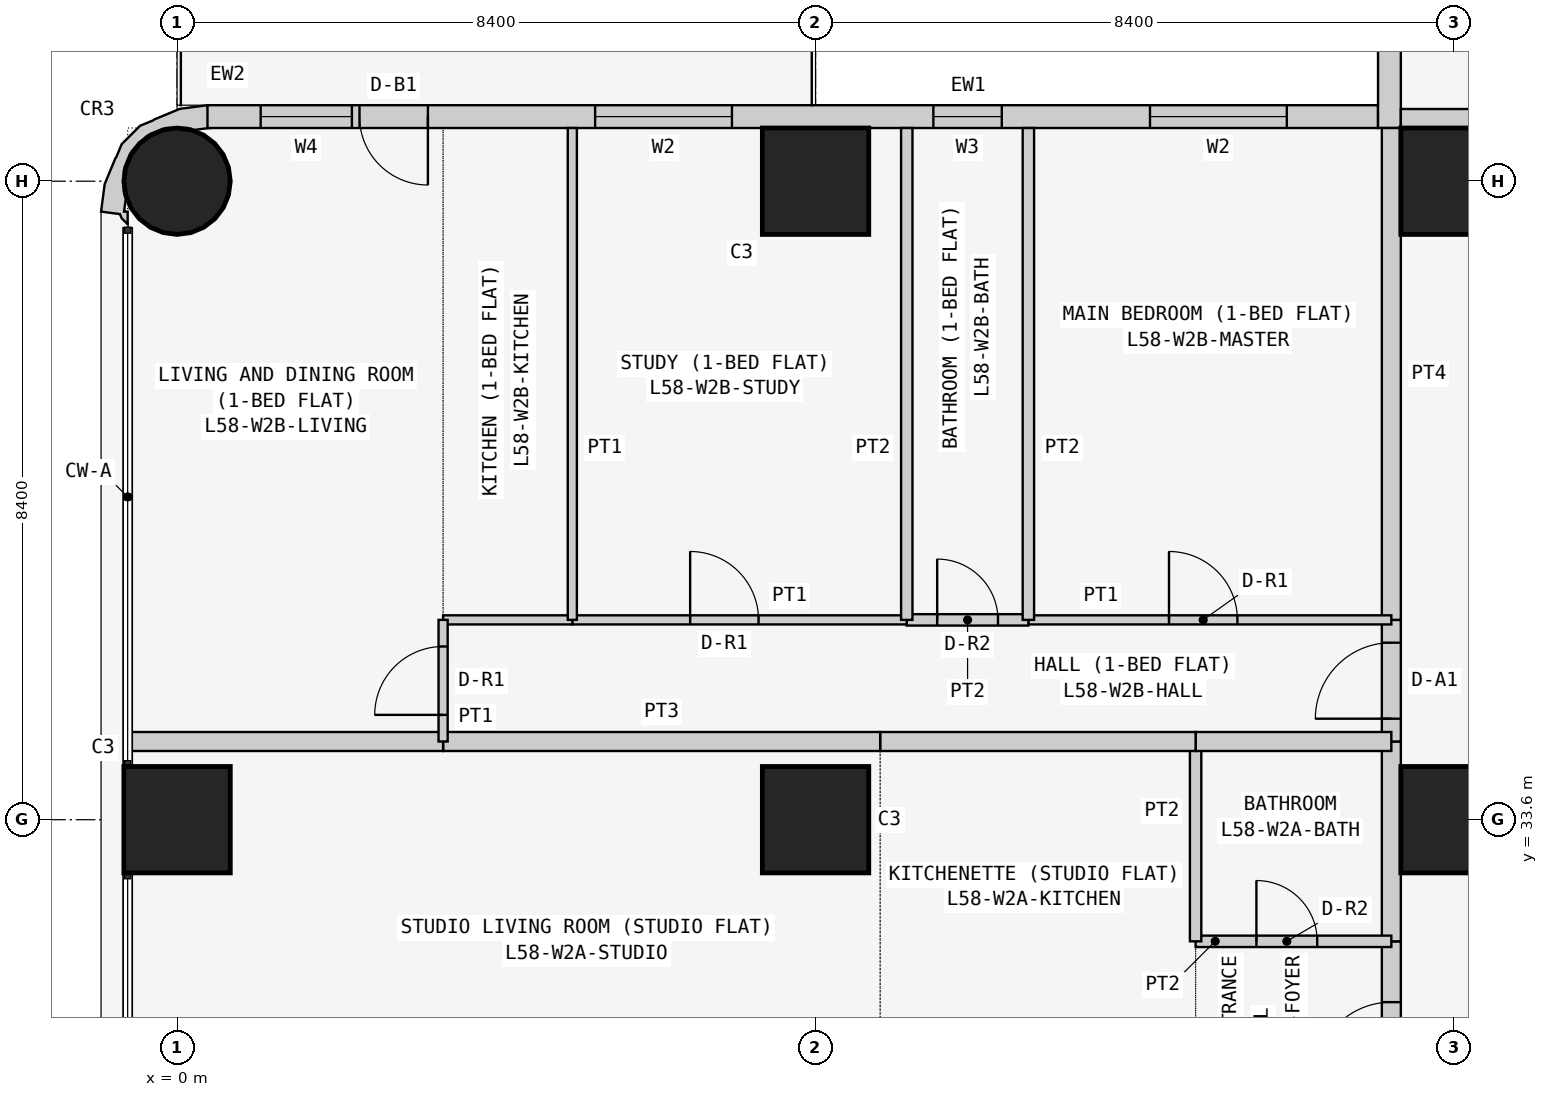
"""IFC4 building model, lengths in metres.
Left out: names, types, materials, properties, quantities, classifications, styles, units other than length and angle.
Written with IfcOpenShell. Run it as: python <this file> out.ifc"""

import sys

from ifc_helpers import new_model, si_unit, direction, frame, frame_2d, origin, origin_2d, place, context, subcontext, project, spatial, polyline, rectangle, circle, outline, extrude, element, fill, save


model = new_model("IFC4")
c1 = context("Model", 3, precision=1e-05, world=origin(), true_north=direction((0.0, 1.0)))
c2 = subcontext(c1, "Body", "Model", "MODEL_VIEW")
j1 = project(units=[si_unit("LENGTHUNIT", "METRE"), si_unit("PLANEANGLEUNIT", "RADIAN")], contexts=[c1])
p1 = place(None, origin())
s1 = spatial("IfcSite", under=j1, at=p1, CompositionType="ELEMENT")
p2 = place(p1, origin())
s2 = spatial("IfcBuilding", under=s1, at=p2, CompositionType="ELEMENT")
p3 = place(p2, frame((0.0, 0.0, 222.9)))
s3 = spatial("IfcBuildingStorey", under=s2, at=p3, CompositionType="ELEMENT", Elevation=222.9)
p4 = place(p3, frame((0.0, 33.6, 0.0), z_axis=(0.0, 0.0, 1.0), x_axis=(1.0, 0.0, 0.0)))
e1 = element("IfcColumn", 1, at=p4, inside=s3, PredefinedType="COLUMN", context=c2, shape_type="SweptSolid", body=[
    extrude(rectangle(XDim=1.4, YDim=1.4, at=origin_2d()), origin(), (0.0, 0.0, 1.0), 3.6),
])
p5 = place(p3, frame((0.0, 42.0, 0.0), z_axis=(0.0, 0.0, 1.0), x_axis=(1.0, 0.0, 0.0)))
e2 = element("IfcColumn", 2, at=p5, inside=s3, PredefinedType="COLUMN", context=c2, shape_type="SweptSolid", body=[
    extrude(circle(Radius=0.7, at=origin_2d()), origin(), (0.0, 0.0, 1.0), 3.6),
])
for number, where, z_axis, x_axis in (
    (3, (8.4, 33.6, 0.0), (0.0, 0.0, 1.0), (1.0, 0.0, 0.0)),
    (4, (8.4, 42.0, 0.0), (0.0, 0.0, 1.0), (1.0, 0.0, 0.0)),
    (5, (16.8, 33.6, 0.0), (0.0, 0.0, 1.0), (1.0, 0.0, 0.0)),
    (6, (16.8, 42.0, 0.0), (0.0, 0.0, 1.0), (1.0, 0.0, 0.0)),
):
    element("IfcColumn", number, at=place(p3, frame(where, z_axis=z_axis, x_axis=x_axis)), inside=s3, PredefinedType="COLUMN", context=c2, shape_type="SweptSolid", body=[
        extrude(rectangle(XDim=1.4, YDim=1.4, at=origin_2d()), origin(), (0.0, 0.0, 1.0), 3.6),
    ])
p6 = place(p3, frame((15.8, 42.85, 0.0), z_axis=(0.0, 0.0, 1.0), x_axis=(-1.0, 0.0, 0.0)))
e7 = element("IfcWall", 7, at=p6, inside=s3, PredefinedType="SOLIDWALL", context=c2, shape_type="SweptSolid", body=[
    extrude(rectangle(XDim=15.4, YDim=0.3, at=frame_2d((7.7, 0.0))), origin(), (0.0, 0.0, 1.0), 3.45),
])
p7 = place(p6, frame((1.2, 0.0, 0.9)))
e8 = element("IfcOpeningElement", 8, at=p7, cuts=e7, PredefinedType="OPENING", context=c2, shape_type="SweptSolid", body=[
    extrude(rectangle(XDim=1.8, YDim=1.5, at=frame_2d((0.9, 0.75))), frame((0.0, 0.16, 0.0), z_axis=(0.0, -1.0, 0.0), x_axis=(1.0, 0.0, 0.0)), (0.0, 0.0, 1.0), 0.32),
])
p8 = place(p6, frame((4.95, 0.0, 1.5)))
e9 = element("IfcOpeningElement", 9, at=p8, cuts=e7, PredefinedType="OPENING", context=c2, shape_type="SweptSolid", body=[
    extrude(rectangle(XDim=0.9, YDim=0.7, at=frame_2d((0.45, 0.35))), frame((0.0, 0.16, 0.0), z_axis=(0.0, -1.0, 0.0), x_axis=(1.0, 0.0, 0.0)), (0.0, 0.0, 1.0), 0.32),
])
p9 = place(p6, frame((8.5, 0.0, 0.9)))
e10 = element("IfcOpeningElement", 10, at=p9, cuts=e7, PredefinedType="OPENING", context=c2, shape_type="SweptSolid", body=[
    extrude(rectangle(XDim=1.8, YDim=1.5, at=frame_2d((0.9, 0.75))), frame((0.0, 0.16, 0.0), z_axis=(0.0, -1.0, 0.0), x_axis=(1.0, 0.0, 0.0)), (0.0, 0.0, 1.0), 0.32),
])
p10 = place(p6, frame((12.5, 0.0, 0.0)))
e11 = element("IfcOpeningElement", 11, at=p10, cuts=e7, PredefinedType="OPENING", context=c2, shape_type="SweptSolid", body=[
    extrude(rectangle(XDim=0.9, YDim=2.4, at=frame_2d((0.45, 1.2))), frame((0.0, 0.16, 0.0), z_axis=(0.0, -1.0, 0.0), x_axis=(1.0, 0.0, 0.0)), (0.0, 0.0, 1.0), 0.32),
])
p11 = place(p6, frame((13.5, 0.0, 0.9)))
e12 = element("IfcOpeningElement", 12, at=p11, cuts=e7, PredefinedType="OPENING", context=c2, shape_type="SweptSolid", body=[
    extrude(rectangle(XDim=1.2, YDim=1.5, at=frame_2d((0.6, 0.75))), frame((0.0, 0.16, 0.0), z_axis=(0.0, -1.0, 0.0), x_axis=(1.0, 0.0, 0.0)), (0.0, 0.0, 1.0), 0.32),
])
p12 = place(p3, frame((15.95, 50.0, 0.0), z_axis=(0.0, 0.0, 1.0), x_axis=(0.0, -1.0, 0.0)))
e13 = element("IfcWall", 13, at=p12, inside=s3, PredefinedType="SOLIDWALL", context=c2, shape_type="SweptSolid", body=[
    extrude(rectangle(XDim=7.3, YDim=0.3, at=frame_2d((3.65, 0.0))), origin(), (0.0, 0.0, 1.0), 3.45),
])
p13 = place(p12, frame((3.1, 0.0, 0.9)))
e14 = element("IfcOpeningElement", 14, at=p13, cuts=e13, PredefinedType="OPENING", context=c2, shape_type="SweptSolid", body=[
    extrude(rectangle(XDim=2.4, YDim=1.5, at=frame_2d((1.2, 0.75))), frame((0.0, 0.16, 0.0), z_axis=(0.0, -1.0, 0.0), x_axis=(1.0, 0.0, 0.0)), (0.0, 0.0, 1.0), 0.32),
])
p14 = place(p12, frame((0.75, 0.0, 0.9)))
e15 = element("IfcOpeningElement", 15, at=p14, cuts=e13, PredefinedType="OPENING", context=c2, shape_type="SweptSolid", body=[
    extrude(rectangle(XDim=1.2, YDim=1.5, at=frame_2d((0.6, 0.75))), frame((0.0, 0.16, 0.0), z_axis=(0.0, -1.0, 0.0), x_axis=(1.0, 0.0, 0.0)), (0.0, 0.0, 1.0), 0.32),
])
p15 = place(p3, frame((0.29, 42.724, 0.0), z_axis=(0.0, 0.0, 1.0), x_axis=(-0.898030234854, 0.439933741929, 0.0)))
e16 = element("IfcWall", 16, at=p15, inside=s3, PredefinedType="SOLIDWALL", context=c2, shape_type="SweptSolid", body=[
    extrude(outline(polyline([(-0.145, -0.044), (0.022, -0.296), (0.327, -0.094), (0.568, 0.18), (0.578, 0.199), (0.7, 0.338), (0.811, 0.661), (0.799, 0.846), (0.803, 0.866), (0.78, 1.231), (0.664, 1.577), (0.426, 1.497), (0.382, 1.536), (0.276, 1.572), (0.349, 1.423), (0.392, 1.444), (0.453, 1.261), (0.51, 1.211), (0.632, 0.961), (0.65, 0.683), (0.56, 0.419), (0.375, 0.21), (0.125, 0.087), (0.05, 0.082), (-0.127, -0.035), (-0.145, -0.044)])), origin(), (0.0, 0.0, 1.0), 3.45),
])
p16 = place(p3, frame((16.1, 42.825, 0.0), z_axis=(0.0, 0.0, 1.0), x_axis=(1.0, 0.0, 0.0)))
e17 = element("IfcWall", 17, at=p16, inside=s3, PredefinedType="PARTITIONING", context=c2, shape_type="SweptSolid", body=[
    extrude(rectangle(XDim=6.471, YDim=0.25, at=frame_2d((3.235, 0.0))), origin(), (0.0, 0.0, 1.0), 3.45),
])
p17 = place(p3, frame((15.975, 29.4, 0.0), z_axis=(0.0, 0.0, 1.0), x_axis=(0.0, 1.0, 0.0)))
e18 = element("IfcWall", 18, at=p17, inside=s3, PredefinedType="PARTITIONING", context=c2, shape_type="SweptSolid", body=[
    extrude(rectangle(XDim=2.6, YDim=0.25, at=frame_2d((1.3, 0.0))), origin(), (0.0, 0.0, 1.0), 3.45),
])
p18 = place(p17, frame((0.8, 0.0, 0.0)))
e19 = element("IfcOpeningElement", 19, at=p18, cuts=e18, PredefinedType="OPENING", context=c2, shape_type="SweptSolid", body=[
    extrude(rectangle(XDim=1.0, YDim=2.1, at=frame_2d((0.5, 1.05))), frame((0.0, 0.135, 0.0), z_axis=(0.0, -1.0, 0.0), x_axis=(1.0, 0.0, 0.0)), (0.0, 0.0, 1.0), 0.27),
])
p19 = place(p3, frame((15.975, 32.0, 0.0), z_axis=(0.0, 0.0, 1.0), x_axis=(0.0, 1.0, 0.0)))
e20 = element("IfcWall", 20, at=p19, inside=s3, PredefinedType="PARTITIONING", context=c2, shape_type="SweptSolid", body=[
    extrude(rectangle(XDim=2.629, YDim=0.25, at=frame_2d((1.314, 0.0))), origin(), (0.0, 0.0, 1.0), 3.45),
])
p20 = place(p3, frame((15.975, 34.629, 0.0), z_axis=(0.0, 0.0, 1.0), x_axis=(0.0, 1.0, 0.0)))
e21 = element("IfcWall", 21, at=p20, inside=s3, PredefinedType="PARTITIONING", context=c2, shape_type="SweptSolid", body=[
    extrude(rectangle(XDim=1.6, YDim=0.25, at=frame_2d((0.8, 0.0))), origin(), (0.0, 0.0, 1.0), 3.45),
])
p21 = place(p20, frame((0.3, 0.0, 0.0)))
e22 = element("IfcOpeningElement", 22, at=p21, cuts=e21, PredefinedType="OPENING", context=c2, shape_type="SweptSolid", body=[
    extrude(rectangle(XDim=1.0, YDim=2.1, at=frame_2d((0.5, 1.05))), frame((0.0, 0.135, 0.0), z_axis=(0.0, -1.0, 0.0), x_axis=(1.0, 0.0, 0.0)), (0.0, 0.0, 1.0), 0.27),
])
p22 = place(p3, frame((15.975, 36.229, 0.0), z_axis=(0.0, 0.0, 1.0), x_axis=(0.0, 1.0, 0.0)))
e23 = element("IfcWall", 23, at=p22, inside=s3, PredefinedType="PARTITIONING", context=c2, shape_type="SweptSolid", body=[
    extrude(rectangle(XDim=6.471, YDim=0.25, at=frame_2d((3.235, 0.0))), origin(), (0.0, 0.0, 1.0), 3.45),
])
p23 = place(p3, frame((13.4, 32.0, 0.0), z_axis=(0.0, 0.0, 1.0), x_axis=(1.0, 0.0, 0.0)))
e24 = element("IfcWall", 24, at=p23, inside=s3, PredefinedType="PARTITIONING", context=c2, shape_type="SweptSolid", body=[
    extrude(rectangle(XDim=2.575, YDim=0.15, at=frame_2d((1.288, 0.0))), origin(), (0.0, 0.0, 1.0), 3.45),
])
p24 = place(p23, frame((0.8, 0.0, 0.0)))
e25 = element("IfcOpeningElement", 25, at=p24, cuts=e24, PredefinedType="OPENING", context=c2, shape_type="SweptSolid", body=[
    extrude(rectangle(XDim=0.8, YDim=2.1, at=frame_2d((0.4, 1.05))), frame((0.0, 0.085, 0.0), z_axis=(0.0, -1.0, 0.0), x_axis=(1.0, 0.0, 0.0)), (0.0, 0.0, 1.0), 0.17),
])
p25 = place(p3, frame((13.4, 32.0, 0.0), z_axis=(0.0, 0.0, 1.0), x_axis=(0.0, 1.0, 0.0)))
e26 = element("IfcWall", 26, at=p25, inside=s3, PredefinedType="PARTITIONING", context=c2, shape_type="SweptSolid", body=[
    extrude(rectangle(XDim=2.629, YDim=0.15, at=frame_2d((1.314, 0.0))), origin(), (0.0, 0.0, 1.0), 3.45),
])
p26 = place(p3, frame((13.4, 34.629, 0.0), z_axis=(0.0, 0.0, 1.0), x_axis=(1.0, 0.0, 0.0)))
e27 = element("IfcWall", 27, at=p26, inside=s3, PredefinedType="PARTITIONING", context=c2, shape_type="SweptSolid", body=[
    extrude(rectangle(XDim=2.575, YDim=0.25, at=frame_2d((1.288, 0.0))), origin(), (0.0, 0.0, 1.0), 3.45),
])
p27 = place(p3, frame((9.25, 34.629, 0.0), z_axis=(0.0, 0.0, 1.0), x_axis=(1.0, 0.0, 0.0)))
e28 = element("IfcWall", 28, at=p27, inside=s3, PredefinedType="PARTITIONING", context=c2, shape_type="SweptSolid", body=[
    extrude(rectangle(XDim=4.15, YDim=0.25, at=frame_2d((2.075, 0.0))), origin(), (0.0, 0.0, 1.0), 3.45),
])
p28 = place(p3, frame((3.5, 34.629, 0.0), z_axis=(0.0, 0.0, 1.0), x_axis=(1.0, 0.0, 0.0)))
e29 = element("IfcWall", 29, at=p28, inside=s3, PredefinedType="PARTITIONING", context=c2, shape_type="SweptSolid", body=[
    extrude(rectangle(XDim=5.75, YDim=0.25, at=frame_2d((2.875, 0.0))), origin(), (0.0, 0.0, 1.0), 3.45),
])
p29 = place(p3, frame((-0.65, 34.629, 0.0), z_axis=(0.0, 0.0, 1.0), x_axis=(1.0, 0.0, 0.0)))
e30 = element("IfcWall", 30, at=p29, inside=s3, PredefinedType="PARTITIONING", context=c2, shape_type="SweptSolid", body=[
    extrude(rectangle(XDim=4.15, YDim=0.25, at=frame_2d((2.075, 0.0))), origin(), (0.0, 0.0, 1.0), 3.45),
])
p30 = place(p3, frame((11.2, 36.229, 0.0), z_axis=(0.0, 0.0, 1.0), x_axis=(1.0, 0.0, 0.0)))
e31 = element("IfcWall", 31, at=p30, inside=s3, PredefinedType="PARTITIONING", context=c2, shape_type="SweptSolid", body=[
    extrude(rectangle(XDim=4.775, YDim=0.12, at=frame_2d((2.388, 0.0))), origin(), (0.0, 0.0, 1.0), 3.45),
])
p31 = place(p30, frame((1.85, 0.0, 0.0)))
e32 = element("IfcOpeningElement", 32, at=p31, cuts=e31, PredefinedType="OPENING", context=c2, shape_type="SweptSolid", body=[
    extrude(rectangle(XDim=0.9, YDim=2.1, at=frame_2d((0.45, 1.05))), frame((0.0, 0.07, 0.0), z_axis=(0.0, -1.0, 0.0), x_axis=(1.0, 0.0, 0.0)), (0.0, 0.0, 1.0), 0.14),
])
p32 = place(p3, frame((9.6, 36.229, 0.0), z_axis=(0.0, 0.0, 1.0), x_axis=(1.0, 0.0, 0.0)))
e33 = element("IfcWall", 33, at=p32, inside=s3, PredefinedType="PARTITIONING", context=c2, shape_type="SweptSolid", body=[
    extrude(rectangle(XDim=1.6, YDim=0.15, at=frame_2d((0.8, 0.0))), origin(), (0.0, 0.0, 1.0), 3.45),
])
p33 = place(p32, frame((0.4, 0.0, 0.0)))
e34 = element("IfcOpeningElement", 34, at=p33, cuts=e33, PredefinedType="OPENING", context=c2, shape_type="SweptSolid", body=[
    extrude(rectangle(XDim=0.8, YDim=2.1, at=frame_2d((0.4, 1.05))), frame((0.0, 0.085, 0.0), z_axis=(0.0, -1.0, 0.0), x_axis=(1.0, 0.0, 0.0)), (0.0, 0.0, 1.0), 0.17),
])
p34 = place(p3, frame((5.2, 36.229, 0.0), z_axis=(0.0, 0.0, 1.0), x_axis=(1.0, 0.0, 0.0)))
e35 = element("IfcWall", 35, at=p34, inside=s3, PredefinedType="PARTITIONING", context=c2, shape_type="SweptSolid", body=[
    extrude(rectangle(XDim=4.4, YDim=0.12, at=frame_2d((2.2, 0.0))), origin(), (0.0, 0.0, 1.0), 3.45),
])
p35 = place(p34, frame((1.55, 0.0, 0.0)))
e36 = element("IfcOpeningElement", 36, at=p35, cuts=e35, PredefinedType="OPENING", context=c2, shape_type="SweptSolid", body=[
    extrude(rectangle(XDim=0.9, YDim=2.1, at=frame_2d((0.45, 1.05))), frame((0.0, 0.07, 0.0), z_axis=(0.0, -1.0, 0.0), x_axis=(1.0, 0.0, 0.0)), (0.0, 0.0, 1.0), 0.14),
])
p36 = place(p3, frame((3.5, 36.229, 0.0), z_axis=(0.0, 0.0, 1.0), x_axis=(1.0, 0.0, 0.0)))
e37 = element("IfcWall", 37, at=p36, inside=s3, PredefinedType="PARTITIONING", context=c2, shape_type="SweptSolid", body=[
    extrude(rectangle(XDim=1.7, YDim=0.12, at=frame_2d((0.85, 0.0))), origin(), (0.0, 0.0, 1.0), 3.45),
])
p37 = place(p3, frame((3.5, 34.629, 0.0), z_axis=(0.0, 0.0, 1.0), x_axis=(0.0, 1.0, 0.0)))
e38 = element("IfcWall", 38, at=p37, inside=s3, PredefinedType="PARTITIONING", context=c2, shape_type="SweptSolid", body=[
    extrude(rectangle(XDim=1.6, YDim=0.12, at=frame_2d((0.8, 0.0))), origin(), (0.0, 0.0, 1.0), 3.45),
])
p38 = place(p37, frame((0.35, 0.0, 0.0)))
e39 = element("IfcOpeningElement", 39, at=p38, cuts=e38, PredefinedType="OPENING", context=c2, shape_type="SweptSolid", body=[
    extrude(rectangle(XDim=0.9, YDim=2.1, at=frame_2d((0.45, 1.05))), frame((0.0, 0.07, 0.0), z_axis=(0.0, -1.0, 0.0), x_axis=(1.0, 0.0, 0.0)), (0.0, 0.0, 1.0), 0.14),
])
for number, where, z_axis, x_axis in (
    (40, (11.2, 36.229, 0.0), (0.0, 0.0, 1.0), (0.0, 1.0, 0.0)),
    (41, (9.6, 36.229, 0.0), (0.0, 0.0, 1.0), (0.0, 1.0, 0.0)),
):
    element("IfcWall", number, at=place(p3, frame(where, z_axis=z_axis, x_axis=x_axis)), inside=s3, PredefinedType="PARTITIONING", context=c2, shape_type="SweptSolid", body=[
        extrude(rectangle(XDim=6.471, YDim=0.15, at=frame_2d((3.235, 0.0))), origin(), (0.0, 0.0, 1.0), 3.45),
    ])
p39 = place(p3, frame((5.2, 36.229, 0.0), z_axis=(0.0, 0.0, 1.0), x_axis=(0.0, 1.0, 0.0)))
e42 = element("IfcWall", 42, at=p39, inside=s3, PredefinedType="PARTITIONING", context=c2, shape_type="SweptSolid", body=[
    extrude(rectangle(XDim=6.471, YDim=0.12, at=frame_2d((3.235, 0.0))), origin(), (0.0, 0.0, 1.0), 3.45),
])
p40 = place(p7, origin())
e43 = element("IfcWindow", 43, at=p40, inside=s3, PartitioningType="SINGLE_PANEL", PredefinedType="WINDOW", context=c2, shape_type="SweptSolid", body=[
    extrude(rectangle(XDim=1.8, YDim=1.5, at=frame_2d((0.9, 0.75))), frame((0.0, 0.03, 0.0), z_axis=(0.0, -1.0, 0.0), x_axis=(1.0, 0.0, 0.0)), (0.0, 0.0, 1.0), 0.06),
])
fill(e8, e43)
p41 = place(p8, origin())
e44 = element("IfcWindow", 44, at=p41, inside=s3, PartitioningType="SINGLE_PANEL", PredefinedType="WINDOW", context=c2, shape_type="SweptSolid", body=[
    extrude(rectangle(XDim=0.9, YDim=0.7, at=frame_2d((0.45, 0.35))), frame((0.0, 0.03, 0.0), z_axis=(0.0, -1.0, 0.0), x_axis=(1.0, 0.0, 0.0)), (0.0, 0.0, 1.0), 0.06),
])
fill(e9, e44)
p42 = place(p9, origin())
e45 = element("IfcWindow", 45, at=p42, inside=s3, PartitioningType="SINGLE_PANEL", PredefinedType="WINDOW", context=c2, shape_type="SweptSolid", body=[
    extrude(rectangle(XDim=1.8, YDim=1.5, at=frame_2d((0.9, 0.75))), frame((0.0, 0.03, 0.0), z_axis=(0.0, -1.0, 0.0), x_axis=(1.0, 0.0, 0.0)), (0.0, 0.0, 1.0), 0.06),
])
fill(e10, e45)
p43 = place(p10, origin())
e46 = element("IfcDoor", 46, at=p43, inside=s3, OperationType="SINGLE_SWING_LEFT", PredefinedType="DOOR", context=c2, shape_type="SweptSolid", body=[
    extrude(rectangle(XDim=0.9, YDim=2.4, at=frame_2d((0.45, 1.2))), frame((0.0, 0.025, 0.0), z_axis=(0.0, -1.0, 0.0), x_axis=(1.0, 0.0, 0.0)), (0.0, 0.0, 1.0), 0.05),
])
fill(e11, e46)
p44 = place(p11, origin())
e47 = element("IfcWindow", 47, at=p44, inside=s3, PartitioningType="SINGLE_PANEL", PredefinedType="WINDOW", context=c2, shape_type="SweptSolid", body=[
    extrude(rectangle(XDim=1.2, YDim=1.5, at=frame_2d((0.6, 0.75))), frame((0.0, 0.03, 0.0), z_axis=(0.0, -1.0, 0.0), x_axis=(1.0, 0.0, 0.0)), (0.0, 0.0, 1.0), 0.06),
])
fill(e12, e47)
p45 = place(p18, origin())
e48 = element("IfcDoor", 48, at=p45, inside=s3, OperationType="SINGLE_SWING_LEFT", PredefinedType="DOOR", context=c2, shape_type="SweptSolid", body=[
    extrude(rectangle(XDim=1.0, YDim=2.1, at=frame_2d((0.5, 1.05))), frame((0.0, 0.025, 0.0), z_axis=(0.0, -1.0, 0.0), x_axis=(1.0, 0.0, 0.0)), (0.0, 0.0, 1.0), 0.05),
])
fill(e19, e48)
p46 = place(p24, origin())
e49 = element("IfcDoor", 49, at=p46, inside=s3, OperationType="SINGLE_SWING_LEFT", PredefinedType="DOOR", context=c2, shape_type="SweptSolid", body=[
    extrude(rectangle(XDim=0.8, YDim=2.1, at=frame_2d((0.4, 1.05))), frame((0.0, 0.025, 0.0), z_axis=(0.0, -1.0, 0.0), x_axis=(1.0, 0.0, 0.0)), (0.0, 0.0, 1.0), 0.05),
])
fill(e25, e49)
p47 = place(p21, origin())
e50 = element("IfcDoor", 50, at=p47, inside=s3, OperationType="SINGLE_SWING_LEFT", PredefinedType="DOOR", context=c2, shape_type="SweptSolid", body=[
    extrude(rectangle(XDim=1.0, YDim=2.1, at=frame_2d((0.5, 1.05))), frame((0.0, 0.025, 0.0), z_axis=(0.0, -1.0, 0.0), x_axis=(1.0, 0.0, 0.0)), (0.0, 0.0, 1.0), 0.05),
])
fill(e22, e50)
p48 = place(p31, origin())
e51 = element("IfcDoor", 51, at=p48, inside=s3, OperationType="SINGLE_SWING_LEFT", PredefinedType="DOOR", context=c2, shape_type="SweptSolid", body=[
    extrude(rectangle(XDim=0.9, YDim=2.1, at=frame_2d((0.45, 1.05))), frame((0.0, 0.025, 0.0), z_axis=(0.0, -1.0, 0.0), x_axis=(1.0, 0.0, 0.0)), (0.0, 0.0, 1.0), 0.05),
])
fill(e32, e51)
p49 = place(p33, origin())
e52 = element("IfcDoor", 52, at=p49, inside=s3, OperationType="SINGLE_SWING_LEFT", PredefinedType="DOOR", context=c2, shape_type="SweptSolid", body=[
    extrude(rectangle(XDim=0.8, YDim=2.1, at=frame_2d((0.4, 1.05))), frame((0.0, 0.025, 0.0), z_axis=(0.0, -1.0, 0.0), x_axis=(1.0, 0.0, 0.0)), (0.0, 0.0, 1.0), 0.05),
])
fill(e34, e52)
p50 = place(p35, origin())
e53 = element("IfcDoor", 53, at=p50, inside=s3, OperationType="SINGLE_SWING_LEFT", PredefinedType="DOOR", context=c2, shape_type="SweptSolid", body=[
    extrude(rectangle(XDim=0.9, YDim=2.1, at=frame_2d((0.45, 1.05))), frame((0.0, 0.025, 0.0), z_axis=(0.0, -1.0, 0.0), x_axis=(1.0, 0.0, 0.0)), (0.0, 0.0, 1.0), 0.05),
])
fill(e36, e53)
p51 = place(p38, origin())
e54 = element("IfcDoor", 54, at=p51, inside=s3, OperationType="SINGLE_SWING_LEFT", PredefinedType="DOOR", context=c2, shape_type="SweptSolid", body=[
    extrude(rectangle(XDim=0.9, YDim=2.1, at=frame_2d((0.45, 1.05))), frame((0.0, 0.025, 0.0), z_axis=(0.0, -1.0, 0.0), x_axis=(1.0, 0.0, 0.0)), (0.0, 0.0, 1.0), 0.05),
])
fill(e39, e54)
save(model, sys.argv[1])
